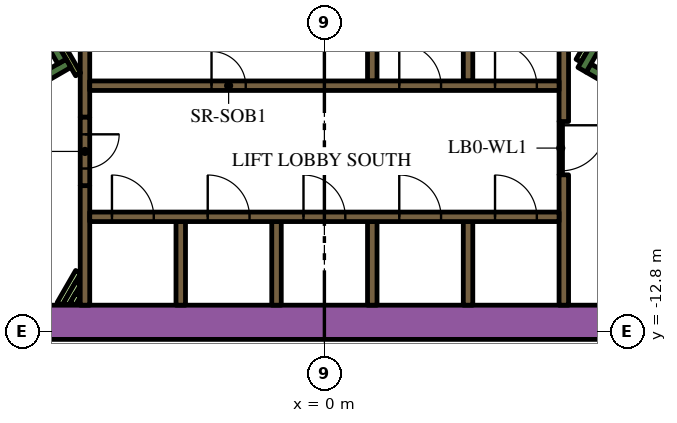
"""IFC4 building model, lengths in metres.
Left out: names, types, materials, properties, quantities, classifications, styles, units other than length and angle.
Written with IfcOpenShell. Run it as: python <this file> out.ifc"""

import sys

from ifc_helpers import new_model, si_unit, direction, frame, frame_2d, origin, place, context, subcontext, project, spatial, rectangle, extrude, element, fill, save


model = new_model("IFC4")
c1 = context("Model", 3, precision=1e-05, world=origin(), true_north=direction((0.0, 1.0)))
c2 = subcontext(c1, "Body", "Model", "MODEL_VIEW")
j1 = project(units=[si_unit("LENGTHUNIT", "METRE"), si_unit("PLANEANGLEUNIT", "RADIAN")], contexts=[c1])
p1 = place(None, origin())
s1 = spatial("IfcSite", under=j1, at=p1, CompositionType="ELEMENT")
p2 = place(p1, origin())
s2 = spatial("IfcBuilding", under=s1, at=p2, CompositionType="ELEMENT")
p3 = place(p2, frame((0.0, 0.0, 31.5)))
s3 = spatial("IfcBuildingStorey", under=s2, at=p3, CompositionType="ELEMENT", Elevation=31.5)
p4 = place(p3, frame((-12.019, -12.55, 0.0), z_axis=(0.0, 0.0, 1.0), x_axis=(1.0, 0.0, 0.0)))
e1 = element("IfcWall", 1, at=p4, inside=s3, PredefinedType="SOLIDWALL", context=c2, shape_type="SweptSolid", body=[
    extrude(rectangle(XDim=21.63, YDim=0.9, at=frame_2d((10.815, 0.0))), origin(), (0.0, 0.0, 1.0), 3.9),
])
p5 = place(p3, frame((12.84, -9.261, 0.0), z_axis=(0.0, 0.0, 1.0), x_axis=(-0.866013990052, 0.500019768644, 0.0)))
e2 = element("IfcWall", 2, at=p5, inside=s3, PredefinedType="SOLIDWALL", context=c2, shape_type="SweptSolid", body=[
    extrude(rectangle(XDim=6.8, YDim=0.25, at=frame_2d((3.4, 0.0))), origin(), (0.0, 0.0, 1.0), 3.9),
])
p6 = place(p3, frame((6.78, -5.906, 0.0), z_axis=(0.0, 0.0, 1.0), x_axis=(0.500223362819, 0.865896406789, 0.0)))
e3 = element("IfcWall", 3, at=p6, inside=s3, PredefinedType="SOLIDWALL", context=c2, shape_type="SweptSolid", body=[
    extrude(rectangle(XDim=0.675, YDim=0.25, at=frame_2d((0.337, 0.0))), origin(), (0.0, 0.0, 1.0), 3.9),
])
p7 = place(p3, frame((-12.84, -9.261, 0.0), z_axis=(0.0, 0.0, 1.0), x_axis=(0.866016039709, 0.500016218704, 0.0)))
e4 = element("IfcWall", 4, at=p7, inside=s3, PredefinedType="SOLIDWALL", context=c2, shape_type="SweptSolid", body=[
    extrude(rectangle(XDim=7.05, YDim=0.25, at=frame_2d((3.525, 0.0))), origin(), (0.0, 0.0, 1.0), 3.9),
])
p8 = place(p3, frame((-6.905, -5.69, 0.0), z_axis=(0.0, 0.0, 1.0), x_axis=(-0.500402024738, 0.865793170242, 0.0)))
e5 = element("IfcWall", 5, at=p8, inside=s3, PredefinedType="SOLIDWALL", context=c2, shape_type="SweptSolid", body=[
    extrude(rectangle(XDim=0.425, YDim=0.25, at=frame_2d((0.212, 0.0))), origin(), (0.0, 0.0, 1.0), 3.9),
])
p9 = place(p3, frame((-3.78, -12.1, 0.0), z_axis=(0.0, 0.0, 1.0), x_axis=(0.0, 1.0, 0.0)))
e6 = element("IfcWall", 6, at=p9, inside=s3, PredefinedType="SOLIDWALL", context=c2, shape_type="SweptSolid", body=[
    extrude(rectangle(XDim=2.2, YDim=0.25, at=frame_2d((1.1, 0.0))), origin(), (0.0, 0.0, 1.0), 3.9),
])
p10 = place(p3, frame((-6.3, -12.1, 0.0), z_axis=(0.0, 0.0, 1.0), x_axis=(0.0, 1.0, 0.0)))
e7 = element("IfcWall", 7, at=p10, inside=s3, PredefinedType="SOLIDWALL", context=c2, shape_type="SweptSolid", body=[
    extrude(rectangle(XDim=3.146, YDim=0.25, at=frame_2d((1.573, 0.0))), origin(), (0.0, 0.0, 1.0), 3.9),
])
p11 = place(p3, frame((6.3, -8.67, 0.0), z_axis=(0.0, 0.0, 1.0), x_axis=(0.0, -1.0, 0.0)))
e8 = element("IfcWall", 8, at=p11, inside=s3, PredefinedType="SOLIDWALL", context=c2, shape_type="SweptSolid", body=[
    extrude(rectangle(XDim=3.43, YDim=0.25, at=frame_2d((1.715, 0.0))), origin(), (0.0, 0.0, 1.0), 3.9),
])
p12 = place(p3, frame((6.3, -7.268, 0.0), z_axis=(0.0, 0.0, 1.0), x_axis=(0.0, 1.0, 0.0)))
e9 = element("IfcWall", 9, at=p12, inside=s3, PredefinedType="SOLIDWALL", context=c2, shape_type="SweptSolid", body=[
    extrude(rectangle(XDim=3.268, YDim=0.25, at=frame_2d((1.634, 0.0))), origin(), (0.0, 0.0, 1.0), 3.9),
])
for number, where, z_axis, x_axis in (
    (10, (3.78, -4.0, 0.0), (0.0, 0.0, 1.0), (0.0, -1.0, 0.0)),
    (11, (1.26, -4.0, 0.0), (0.0, 0.0, 1.0), (0.0, -1.0, 0.0)),
):
    element("IfcWall", number, at=place(p3, frame(where, z_axis=z_axis, x_axis=x_axis)), inside=s3, PredefinedType="SOLIDWALL", context=c2, shape_type="SweptSolid", body=[
        extrude(rectangle(XDim=2.2, YDim=0.25, at=frame_2d((1.1, 0.0))), origin(), (0.0, 0.0, 1.0), 3.9),
    ])
p13 = place(p3, frame((-6.3, -4.0, 0.0), z_axis=(0.0, 0.0, 1.0), x_axis=(0.0, -1.0, 0.0)))
e12 = element("IfcWall", 12, at=p13, inside=s3, PredefinedType="SOLIDWALL", context=c2, shape_type="SweptSolid", body=[
    extrude(rectangle(XDim=3.154, YDim=0.25, at=frame_2d((1.577, 0.0))), origin(), (0.0, 0.0, 1.0), 3.9),
])
for number, where, z_axis, x_axis in (
    (13, (3.78, -12.1, 0.0), (0.0, 0.0, 1.0), (0.0, 1.0, 0.0)),
    (14, (1.26, -12.1, 0.0), (0.0, 0.0, 1.0), (0.0, 1.0, 0.0)),
    (15, (-1.26, -12.1, 0.0), (0.0, 0.0, 1.0), (0.0, 1.0, 0.0)),
):
    element("IfcWall", number, at=place(p3, frame(where, z_axis=z_axis, x_axis=x_axis)), inside=s3, PredefinedType="SOLIDWALL", context=c2, shape_type="SweptSolid", body=[
        extrude(rectangle(XDim=2.2, YDim=0.25, at=frame_2d((1.1, 0.0))), origin(), (0.0, 0.0, 1.0), 3.9),
    ])
p14 = place(p3, frame((-6.968, -12.068, 0.0), z_axis=(0.0, 0.0, 1.0), x_axis=(0.49998975084, 0.866031321059, 0.0)))
e16 = element("IfcWall", 16, at=p14, inside=s3, PredefinedType="PARTITIONING", context=c2, shape_type="SweptSolid", body=[
    extrude(rectangle(XDim=0.975, YDim=0.15, at=frame_2d((0.488, 0.0))), origin(), (0.0, 0.0, 1.0), 2.75),
])
p15 = place(p3, frame((-6.794, -12.068, 0.0), z_axis=(0.0, 0.0, 1.0), x_axis=(0.49985693963, 0.866107983974, 0.0)))
e17 = element("IfcWall", 17, at=p15, inside=s3, PredefinedType="PARTITIONING", context=c2, shape_type="SweptSolid", body=[
    extrude(rectangle(XDim=0.629, YDim=0.15, at=frame_2d((0.314, 0.0))), origin(), (0.0, 0.0, 1.0), 2.75),
])
p16 = place(p3, frame((-6.621, -12.068, 0.0), z_axis=(0.0, 0.0, 1.0), x_axis=(0.500046963369, 0.865998287773, 0.0)))
e18 = element("IfcWall", 18, at=p16, inside=s3, PredefinedType="PARTITIONING", context=c2, shape_type="SweptSolid", body=[
    extrude(rectangle(XDim=0.282, YDim=0.15, at=frame_2d((0.141, 0.0))), origin(), (0.0, 0.0, 1.0), 2.75),
])
p17 = place(p3, frame((-6.48, -6.027, 0.0), z_axis=(0.0, 0.0, 1.0), x_axis=(-0.499927229454, 0.866067413802, 0.0)))
e19 = element("IfcWall", 19, at=p17, inside=s3, PredefinedType="PARTITIONING", context=c2, shape_type="SweptSolid", body=[
    extrude(rectangle(XDim=0.929, YDim=0.15, at=frame_2d((0.464, 0.0))), origin(), (0.0, 0.0, 1.0), 3.9),
])
p18 = place(p3, frame((6.945, -5.222, 0.0), z_axis=(0.0, 0.0, 1.0), x_axis=(-0.499818422106, -0.866130212453, 0.0)))
e20 = element("IfcWall", 20, at=p18, inside=s3, PredefinedType="PARTITIONING", context=c2, shape_type="SweptSolid", body=[
    extrude(rectangle(XDim=0.514, YDim=0.15, at=frame_2d((0.257, 0.0))), origin(), (0.0, 0.0, 1.0), 2.75),
])
p19 = place(p3, frame((-6.175, -9.775, 0.0), z_axis=(0.0, 0.0, 1.0), x_axis=(1.0, 0.0, 0.0)))
e21 = element("IfcWall", 21, at=p19, inside=s3, PredefinedType="SOLIDWALL", context=c2, shape_type="SweptSolid", body=[
    extrude(rectangle(XDim=12.35, YDim=0.25, at=frame_2d((6.175, 0.0))), origin(), (0.0, 0.0, 1.0), 3.9),
])
p20 = place(p19, frame((0.585, 0.0, 0.0)))
e22 = element("IfcOpeningElement", 22, at=p20, cuts=e21, PredefinedType="OPENING", context=c2, shape_type="SweptSolid", body=[
    extrude(rectangle(XDim=1.1, YDim=2.1, at=frame_2d((0.55, 1.05))), frame((0.0, 0.135, 0.0), z_axis=(0.0, -1.0, 0.0), x_axis=(1.0, 0.0, 0.0)), (0.0, 0.0, 1.0), 0.27),
])
p21 = place(p19, frame((3.105, 0.0, 0.0)))
e23 = element("IfcOpeningElement", 23, at=p21, cuts=e21, PredefinedType="OPENING", context=c2, shape_type="SweptSolid", body=[
    extrude(rectangle(XDim=1.1, YDim=2.1, at=frame_2d((0.55, 1.05))), frame((0.0, 0.135, 0.0), z_axis=(0.0, -1.0, 0.0), x_axis=(1.0, 0.0, 0.0)), (0.0, 0.0, 1.0), 0.27),
])
p22 = place(p19, frame((5.625, 0.0, 0.0)))
e24 = element("IfcOpeningElement", 24, at=p22, cuts=e21, PredefinedType="OPENING", context=c2, shape_type="SweptSolid", body=[
    extrude(rectangle(XDim=1.1, YDim=2.1, at=frame_2d((0.55, 1.05))), frame((0.0, 0.135, 0.0), z_axis=(0.0, -1.0, 0.0), x_axis=(1.0, 0.0, 0.0)), (0.0, 0.0, 1.0), 0.27),
])
p23 = place(p19, frame((8.145, 0.0, 0.0)))
e25 = element("IfcOpeningElement", 25, at=p23, cuts=e21, PredefinedType="OPENING", context=c2, shape_type="SweptSolid", body=[
    extrude(rectangle(XDim=1.1, YDim=2.1, at=frame_2d((0.55, 1.05))), frame((0.0, 0.135, 0.0), z_axis=(0.0, -1.0, 0.0), x_axis=(1.0, 0.0, 0.0)), (0.0, 0.0, 1.0), 0.27),
])
p24 = place(p19, frame((10.665, 0.0, 0.0)))
e26 = element("IfcOpeningElement", 26, at=p24, cuts=e21, PredefinedType="OPENING", context=c2, shape_type="SweptSolid", body=[
    extrude(rectangle(XDim=1.1, YDim=2.1, at=frame_2d((0.55, 1.05))), frame((0.0, 0.135, 0.0), z_axis=(0.0, -1.0, 0.0), x_axis=(1.0, 0.0, 0.0)), (0.0, 0.0, 1.0), 0.27),
])
p25 = place(p3, frame((-6.175, -6.325, 0.0), z_axis=(0.0, 0.0, 1.0), x_axis=(1.0, 0.0, 0.0)))
e27 = element("IfcWall", 27, at=p25, inside=s3, PredefinedType="SOLIDWALL", context=c2, shape_type="SweptSolid", body=[
    extrude(rectangle(XDim=12.35, YDim=0.25, at=frame_2d((6.175, 0.0))), origin(), (0.0, 0.0, 1.0), 3.9),
])
p26 = place(p25, frame((3.205, 0.0, 0.0)))
e28 = element("IfcOpeningElement", 28, at=p26, cuts=e27, PredefinedType="OPENING", context=c2, shape_type="SweptSolid", body=[
    extrude(rectangle(XDim=0.9, YDim=2.1, at=frame_2d((0.45, 1.05))), frame((0.0, 0.135, 0.0), z_axis=(0.0, -1.0, 0.0), x_axis=(1.0, 0.0, 0.0)), (0.0, 0.0, 1.0), 0.27),
])
p27 = place(p25, frame((8.145, 0.0, 0.0)))
e29 = element("IfcOpeningElement", 29, at=p27, cuts=e27, PredefinedType="OPENING", context=c2, shape_type="SweptSolid", body=[
    extrude(rectangle(XDim=1.1, YDim=2.1, at=frame_2d((0.55, 1.05))), frame((0.0, 0.135, 0.0), z_axis=(0.0, -1.0, 0.0), x_axis=(1.0, 0.0, 0.0)), (0.0, 0.0, 1.0), 0.27),
])
p28 = place(p25, frame((10.665, 0.0, 0.0)))
e30 = element("IfcOpeningElement", 30, at=p28, cuts=e27, PredefinedType="OPENING", context=c2, shape_type="SweptSolid", body=[
    extrude(rectangle(XDim=1.1, YDim=2.1, at=frame_2d((0.55, 1.05))), frame((0.0, 0.135, 0.0), z_axis=(0.0, -1.0, 0.0), x_axis=(1.0, 0.0, 0.0)), (0.0, 0.0, 1.0), 0.27),
])
p29 = place(p3, frame((-6.3, -7.154, 0.0), z_axis=(0.0, 0.0, 1.0), x_axis=(0.0, -1.0, 0.0)))
e31 = element("IfcWall", 31, at=p29, inside=s3, PredefinedType="SOLIDWALL", context=c2, shape_type="SweptSolid", body=[
    extrude(rectangle(XDim=1.8, YDim=0.25, at=frame_2d((0.9, 0.0))), origin(), (0.0, 0.0, 1.0), 3.9),
])
p30 = place(p29, frame((0.45, 0.0, 0.0)))
e32 = element("IfcOpeningElement", 32, at=p30, cuts=e31, PredefinedType="OPENING", context=c2, shape_type="SweptSolid", body=[
    extrude(rectangle(XDim=0.9, YDim=2.1, at=frame_2d((0.45, 1.05))), frame((0.0, 0.135, 0.0), z_axis=(0.0, -1.0, 0.0), x_axis=(1.0, 0.0, 0.0)), (0.0, 0.0, 1.0), 0.27),
])
p31 = place(p3, frame((6.22, -7.266, 0.0), z_axis=(0.0, 0.0, 1.0), x_axis=(0.0, -1.0, 0.0)))
e33 = element("IfcWall", 33, at=p31, inside=s3, PredefinedType="PARTITIONING", context=c2, shape_type="SweptSolid", body=[
    extrude(rectangle(XDim=1.4, YDim=0.09, at=frame_2d((0.7, 0.0))), origin(), (0.0, 0.0, 1.0), 2.75),
])
p32 = place(p31, frame((0.1, 0.0, 0.0)))
e34 = element("IfcOpeningElement", 34, at=p32, cuts=e33, PredefinedType="OPENING", context=c2, shape_type="SweptSolid", body=[
    extrude(rectangle(XDim=1.2, YDim=2.1, at=frame_2d((0.6, 1.05))), frame((0.0, 0.055, 0.0), z_axis=(0.0, -1.0, 0.0), x_axis=(1.0, 0.0, 0.0)), (0.0, 0.0, 1.0), 0.11),
])
p33 = place(p20, origin())
e35 = element("IfcDoor", 35, at=p33, inside=s3, OperationType="DOUBLE_DOOR_SLIDING", PredefinedType="DOOR", context=c2, shape_type="SweptSolid", body=[
    extrude(rectangle(XDim=1.1, YDim=2.1, at=frame_2d((0.55, 1.05))), frame((0.0, 0.025, 0.0), z_axis=(0.0, -1.0, 0.0), x_axis=(1.0, 0.0, 0.0)), (0.0, 0.0, 1.0), 0.05),
])
fill(e22, e35)
p34 = place(p21, origin())
e36 = element("IfcDoor", 36, at=p34, inside=s3, OperationType="DOUBLE_DOOR_SLIDING", PredefinedType="DOOR", context=c2, shape_type="SweptSolid", body=[
    extrude(rectangle(XDim=1.1, YDim=2.1, at=frame_2d((0.55, 1.05))), frame((0.0, 0.025, 0.0), z_axis=(0.0, -1.0, 0.0), x_axis=(1.0, 0.0, 0.0)), (0.0, 0.0, 1.0), 0.05),
])
fill(e23, e36)
p35 = place(p22, origin())
e37 = element("IfcDoor", 37, at=p35, inside=s3, OperationType="DOUBLE_DOOR_SLIDING", PredefinedType="DOOR", context=c2, shape_type="SweptSolid", body=[
    extrude(rectangle(XDim=1.1, YDim=2.1, at=frame_2d((0.55, 1.05))), frame((0.0, 0.025, 0.0), z_axis=(0.0, -1.0, 0.0), x_axis=(1.0, 0.0, 0.0)), (0.0, 0.0, 1.0), 0.05),
])
fill(e24, e37)
p36 = place(p23, origin())
e38 = element("IfcDoor", 38, at=p36, inside=s3, OperationType="DOUBLE_DOOR_SLIDING", PredefinedType="DOOR", context=c2, shape_type="SweptSolid", body=[
    extrude(rectangle(XDim=1.1, YDim=2.1, at=frame_2d((0.55, 1.05))), frame((0.0, 0.025, 0.0), z_axis=(0.0, -1.0, 0.0), x_axis=(1.0, 0.0, 0.0)), (0.0, 0.0, 1.0), 0.05),
])
fill(e25, e38)
p37 = place(p24, origin())
e39 = element("IfcDoor", 39, at=p37, inside=s3, OperationType="DOUBLE_DOOR_SLIDING", PredefinedType="DOOR", context=c2, shape_type="SweptSolid", body=[
    extrude(rectangle(XDim=1.1, YDim=2.1, at=frame_2d((0.55, 1.05))), frame((0.0, 0.025, 0.0), z_axis=(0.0, -1.0, 0.0), x_axis=(1.0, 0.0, 0.0)), (0.0, 0.0, 1.0), 0.05),
])
fill(e26, e39)
p38 = place(p26, origin())
e40 = element("IfcDoor", 40, at=p38, inside=s3, OperationType="SINGLE_SWING_LEFT", PredefinedType="DOOR", context=c2, shape_type="SweptSolid", body=[
    extrude(rectangle(XDim=0.9, YDim=2.1, at=frame_2d((0.45, 1.05))), frame((0.0, 0.025, 0.0), z_axis=(0.0, -1.0, 0.0), x_axis=(1.0, 0.0, 0.0)), (0.0, 0.0, 1.0), 0.05),
])
fill(e28, e40)
p39 = place(p27, origin())
e41 = element("IfcDoor", 41, at=p39, inside=s3, OperationType="DOUBLE_DOOR_SLIDING", PredefinedType="DOOR", context=c2, shape_type="SweptSolid", body=[
    extrude(rectangle(XDim=1.1, YDim=2.1, at=frame_2d((0.55, 1.05))), frame((0.0, 0.025, 0.0), z_axis=(0.0, -1.0, 0.0), x_axis=(1.0, 0.0, 0.0)), (0.0, 0.0, 1.0), 0.05),
])
fill(e29, e41)
p40 = place(p28, origin())
e42 = element("IfcDoor", 42, at=p40, inside=s3, OperationType="DOUBLE_DOOR_SLIDING", PredefinedType="DOOR", context=c2, shape_type="SweptSolid", body=[
    extrude(rectangle(XDim=1.1, YDim=2.1, at=frame_2d((0.55, 1.05))), frame((0.0, 0.025, 0.0), z_axis=(0.0, -1.0, 0.0), x_axis=(1.0, 0.0, 0.0)), (0.0, 0.0, 1.0), 0.05),
])
fill(e30, e42)
p41 = place(p30, origin())
e43 = element("IfcDoor", 43, at=p41, inside=s3, OperationType="SINGLE_SWING_LEFT", PredefinedType="DOOR", context=c2, shape_type="SweptSolid", body=[
    extrude(rectangle(XDim=0.9, YDim=2.1, at=frame_2d((0.45, 1.05))), frame((0.0, 0.025, 0.0), z_axis=(0.0, -1.0, 0.0), x_axis=(1.0, 0.0, 0.0)), (0.0, 0.0, 1.0), 0.05),
])
fill(e32, e43)
p42 = place(p32, origin())
e44 = element("IfcDoor", 44, at=p42, inside=s3, OperationType="SINGLE_SWING_LEFT", PredefinedType="DOOR", context=c2, shape_type="SweptSolid", body=[
    extrude(rectangle(XDim=1.2, YDim=2.1, at=frame_2d((0.6, 1.05))), frame((0.0, 0.025, 0.0), z_axis=(0.0, -1.0, 0.0), x_axis=(1.0, 0.0, 0.0)), (0.0, 0.0, 1.0), 0.05),
])
fill(e34, e44)
save(model, sys.argv[1])
